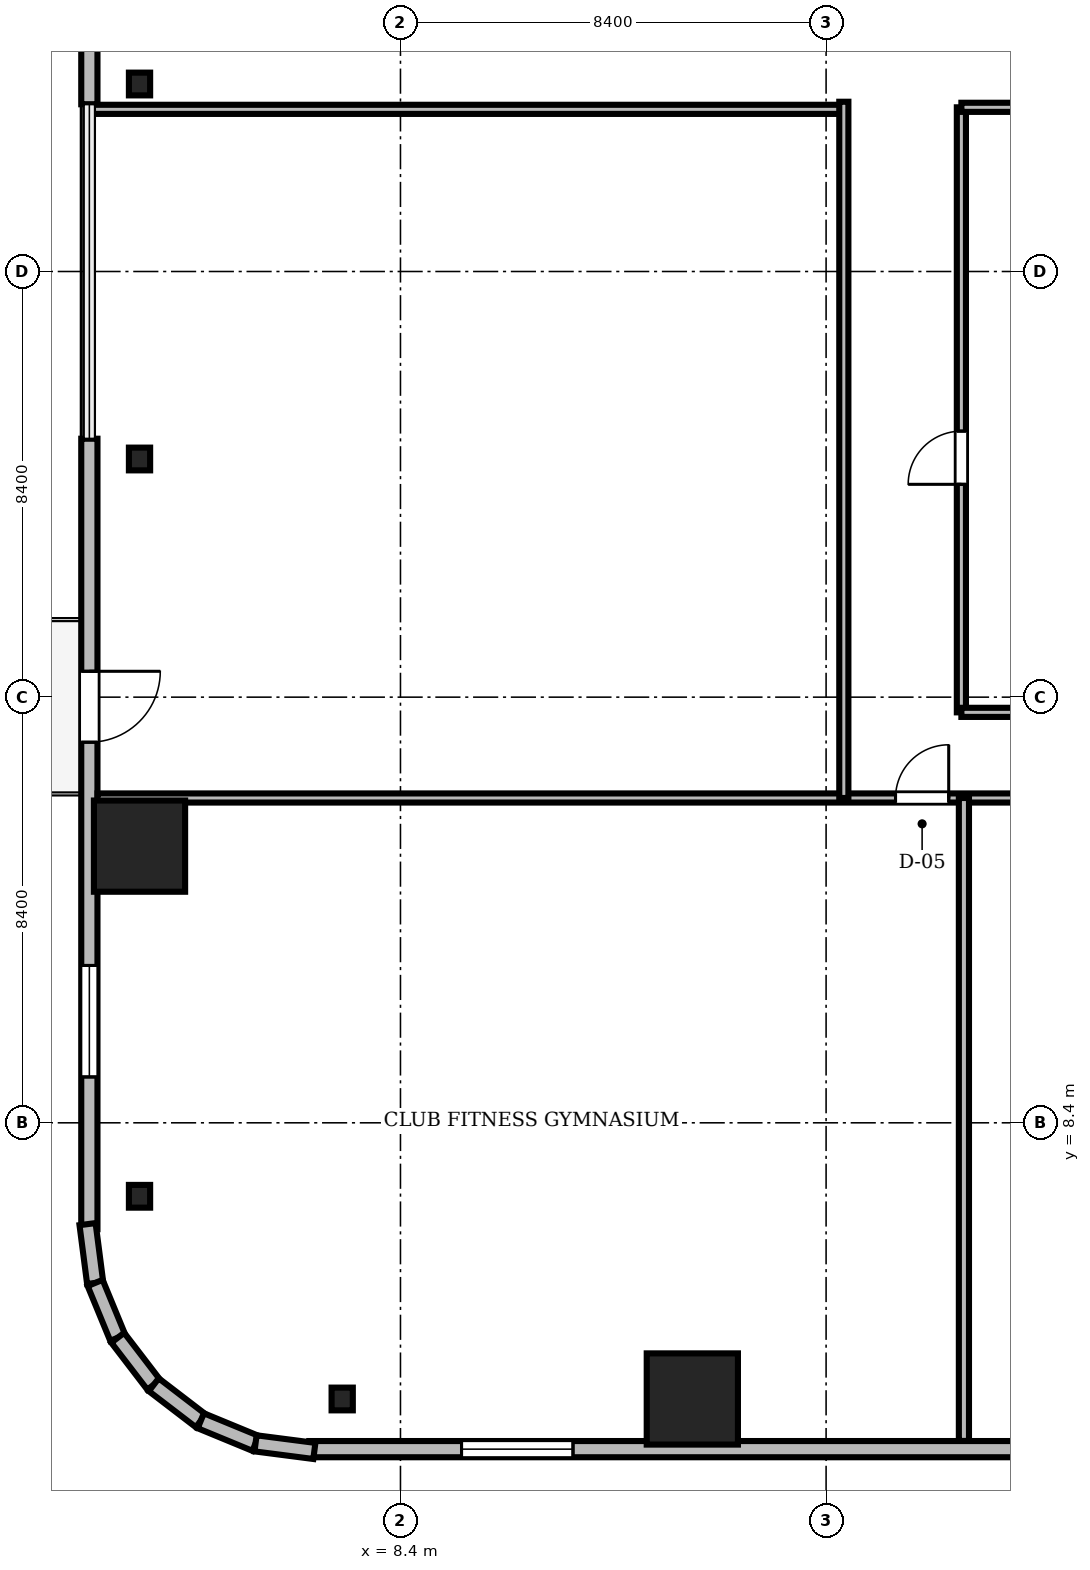
"""IFC4 building model, lengths in metres.
Left out: names, types, materials, properties, quantities, classifications, styles, units other than length and angle.
Written with IfcOpenShell. Run it as: python <this file> out.ifc"""

import sys

from ifc_helpers import new_model, si_unit, direction, frame, frame_2d, origin, origin_2d, place, context, subcontext, project, spatial, rectangle, i_section, extrude, source, transform, mapped, element, fill, save


model = new_model("IFC4")
c1 = context("Model", 3, precision=1e-05, world=origin(), true_north=direction((0.0, 1.0)))
c2 = subcontext(c1, "Body", "Model", "MODEL_VIEW")
j1 = project(units=[si_unit("LENGTHUNIT", "METRE"), si_unit("PLANEANGLEUNIT", "RADIAN")], contexts=[c1])
p1 = place(None, origin())
s1 = spatial("IfcSite", under=j1, at=p1, CompositionType="ELEMENT")
p2 = place(p1, origin())
s2 = spatial("IfcBuilding", under=s1, at=p2, CompositionType="ELEMENT")
p3 = place(p2, frame((0.0, 0.0, 82.35)))
s3 = spatial("IfcBuildingStorey", under=s2, at=p3, CompositionType="ELEMENT", Elevation=82.35)
m1 = source(origin(), c2, "Body", "SweptSolid", [
    extrude(rectangle(XDim=1.8, YDim=1.8, at=origin_2d()), origin(), (0.0, 0.0, 1.0), 3.41),
])
for number, where, z_axis, x_axis in (
    (1, (14.16, 2.95, 0.0), (0.0, 0.0, 1.0), (1.0, 0.0, 0.0)),
    (2, (3.25, 13.86, 0.0), (0.0, 0.0, 1.0), (1.0, 0.0, 0.0)),
):
    element("IfcColumn", number, at=place(p3, frame(where, z_axis=z_axis, x_axis=x_axis)), inside=s3, PredefinedType="COLUMN", context=c2, shape_type="MappedRepresentation", body=[
        mapped(m1, transform((0.0, 0.0, 0.0), scale=1.0)),
    ])
m2 = source(origin(), c2, "Body", "SweptSolid", [
    extrude(i_section(OverallWidth=0.419, OverallDepth=0.449, WebThickness=0.031, FlangeThickness=0.048, FilletRadius=0.015, at=origin_2d()), origin(), (0.0, 0.0, 1.0), 3.41),
])
for number, where, z_axis, x_axis in (
    (3, (7.25, 2.95, 0.0), (0.0, 0.0, 1.0), (1.0, 0.0, 0.0)),
    (4, (3.25, 28.9, 0.0), (0.0, 0.0, 1.0), (1.0, 0.0, 0.0)),
    (5, (3.25, 21.5, 0.0), (0.0, 0.0, 1.0), (1.0, 0.0, 0.0)),
    (6, (3.25, 6.95, 0.0), (0.0, 0.0, 1.0), (1.0, 0.0, 0.0)),
):
    element("IfcColumn", number, at=place(p3, frame(where, z_axis=z_axis, x_axis=x_axis)), inside=s3, PredefinedType="COLUMN", context=c2, shape_type="MappedRepresentation", body=[
        mapped(m2, transform((0.0, 0.0, 0.0), scale=1.0)),
    ])
m3 = source(origin(), c2, "Body", "SweptSolid", [
    extrude(rectangle(XDim=15.6, YDim=0.32, at=frame_2d((7.8, 0.0))), origin(), (0.0, 0.0, 1.0), 3.41),
])
p4 = place(p3, frame((6.6, 1.96, 0.0), z_axis=(0.0, 0.0, 1.0), x_axis=(1.0, 0.0, 0.0)))
e7 = element("IfcWall", 7, at=p4, inside=s3, PredefinedType="SOLIDWALL", context=c2, shape_type="MappedRepresentation", body=[
    mapped(m3, transform((0.0, 0.0, 0.0), scale=1.0)),
])
m4 = source(origin(), c2, "Body", "SweptSolid", [
    extrude(rectangle(XDim=2.2, YDim=2.4, at=frame_2d((1.1, 1.2))), frame((0.0, 0.17, 0.0), z_axis=(0.0, -1.0, 0.0), x_axis=(1.0, 0.0, 0.0)), (0.0, 0.0, 1.0), 0.34),
])
p5 = place(p4, frame((3.005, 0.0, 0.72)))
e8 = element("IfcOpeningElement", 8, at=p5, cuts=e7, PredefinedType="OPENING", context=c2, shape_type="MappedRepresentation", body=[
    mapped(m4, transform((0.0, 0.0, 0.0), scale=1.0)),
])
m5 = source(origin(), c2, "Body", "SweptSolid", [
    extrude(rectangle(XDim=15.6, YDim=0.32, at=frame_2d((7.8, 0.0))), origin(), (0.0, 0.0, 1.0), 3.41),
])
p6 = place(p3, frame((2.26, 44.1, 0.0), z_axis=(0.0, 0.0, 1.0), x_axis=(0.0, -1.0, 0.0)))
e9 = element("IfcWall", 9, at=p6, inside=s3, PredefinedType="SOLIDWALL", context=c2, shape_type="MappedRepresentation", body=[
    mapped(m5, transform((0.0, 0.0, 0.0), scale=1.0)),
])
p7 = place(p6, frame((3.005, 0.0, 0.72)))
e10 = element("IfcOpeningElement", 10, at=p7, cuts=e9, PredefinedType="OPENING", context=c2, shape_type="MappedRepresentation", body=[
    mapped(m4, transform((0.0, 0.0, 0.0), scale=1.0)),
])
p8 = place(p3, frame((2.26, 21.9, 0.0), z_axis=(0.0, 0.0, 1.0), x_axis=(0.0, -1.0, 0.0)))
e11 = element("IfcWall", 11, at=p8, inside=s3, PredefinedType="SOLIDWALL", context=c2, shape_type="MappedRepresentation", body=[
    mapped(m3, transform((0.0, 0.0, 0.0), scale=1.0)),
])
m6 = source(origin(), c2, "Body", "SweptSolid", [
    extrude(rectangle(XDim=1.4, YDim=2.3, at=frame_2d((0.7, 1.15))), frame((0.0, 0.17, 0.0), z_axis=(0.0, -1.0, 0.0), x_axis=(1.0, 0.0, 0.0)), (0.0, 0.0, 1.0), 0.34),
])
p9 = place(p8, frame((4.59, 0.0, 0.0)))
e12 = element("IfcOpeningElement", 12, at=p9, cuts=e11, PredefinedType="OPENING", context=c2, shape_type="MappedRepresentation", body=[
    mapped(m6, transform((0.0, 0.0, 0.0), scale=1.0)),
])
p10 = place(p8, frame((10.395, 0.0, 0.72)))
e13 = element("IfcOpeningElement", 13, at=p10, cuts=e11, PredefinedType="OPENING", context=c2, shape_type="MappedRepresentation", body=[
    mapped(m4, transform((0.0, 0.0, 0.0), scale=1.0)),
])
m7 = source(origin(), c2, "Body", "SweptSolid", [
    extrude(rectangle(XDim=1.171, YDim=0.32, at=frame_2d((0.585, 0.0))), origin(), (0.0, 0.0, 1.0), 3.41),
])
p11 = place(p3, frame((2.224, 6.401, 0.0), z_axis=(0.0, 0.0, 1.0), x_axis=(0.128269133229, -0.991739395941, 0.0)))
e14 = element("IfcWall", 14, at=p11, inside=s3, PredefinedType="SOLIDWALL", context=c2, shape_type="MappedRepresentation", body=[
    mapped(m7, transform((0.0, 0.0, 0.0), scale=1.0)),
])
m8 = source(origin(), c2, "Body", "SweptSolid", [
    extrude(rectangle(XDim=1.169, YDim=0.32, at=frame_2d((0.584, 0.0))), origin(), (0.0, 0.0, 1.0), 3.41),
])
for number, where, z_axis, x_axis in (
    (15, (2.375, 5.24, 0.0), (0.0, 0.0, 1.0), (0.381, -0.925, 0.0)),
    (16, (2.82, 4.159, 0.0), (0.0, 0.0, 1.0), (0.608, -0.794, 0.0)),
):
    element("IfcWall", number, at=place(p3, frame(where, z_axis=z_axis, x_axis=x_axis)), inside=s3, PredefinedType="SOLIDWALL", context=c2, shape_type="MappedRepresentation", body=[
        mapped(m8, transform((0.0, 0.0, 0.0), scale=1.0)),
    ])
m9 = source(origin(), c2, "Body", "SweptSolid", [
    extrude(rectangle(XDim=1.169, YDim=0.32, at=frame_2d((0.584, 0.0))), origin(), (0.0, 0.0, 1.0), 3.41),
])
p12 = place(p3, frame((3.531, 3.231, 0.0), z_axis=(0.0, 0.0, 1.0), x_axis=(0.793663520347, -0.608356981114, 0.0)))
e17 = element("IfcWall", 17, at=p12, inside=s3, PredefinedType="SOLIDWALL", context=c2, shape_type="MappedRepresentation", body=[
    mapped(m9, transform((0.0, 0.0, 0.0), scale=1.0)),
])
m10 = source(origin(), c2, "Body", "SweptSolid", [
    extrude(rectangle(XDim=1.169, YDim=0.32, at=frame_2d((0.585, 0.0))), origin(), (0.0, 0.0, 1.0), 3.41),
])
p13 = place(p3, frame((4.459, 2.52, 0.0), z_axis=(0.0, 0.0, 1.0), x_axis=(0.924479075121, -0.381232789334, 0.0)))
e18 = element("IfcWall", 18, at=p13, inside=s3, PredefinedType="SOLIDWALL", context=c2, shape_type="MappedRepresentation", body=[
    mapped(m10, transform((0.0, 0.0, 0.0), scale=1.0)),
])
m11 = source(origin(), c2, "Body", "SweptSolid", [
    extrude(rectangle(XDim=1.17, YDim=0.32, at=frame_2d((0.585, 0.0))), origin(), (0.0, 0.0, 1.0), 3.41),
])
p14 = place(p3, frame((5.54, 2.074, 0.0), z_axis=(0.0, 0.0, 1.0), x_axis=(0.991762485493, -0.128090485085, 0.0)))
e19 = element("IfcWall", 19, at=p14, inside=s3, PredefinedType="SOLIDWALL", context=c2, shape_type="MappedRepresentation", body=[
    mapped(m11, transform((0.0, 0.0, 0.0), scale=1.0)),
])
m12 = source(origin(), c2, "Body", "SweptSolid", [
    extrude(rectangle(XDim=46.156, YDim=0.18, at=frame_2d((23.078, 0.0))), origin(), (0.0, 0.0, 1.0), 2.652),
])
p15 = place(p3, frame((2.422, 14.81, 0.0), z_axis=(0.0, 0.0, 1.0), x_axis=(1.0, 0.0, 0.0)))
e20 = element("IfcWall", 20, at=p15, inside=s3, PredefinedType="PARTITIONING", context=c2, shape_type="MappedRepresentation", body=[
    mapped(m12, transform((0.0, 0.0, 0.0), scale=1.0)),
])
m13 = source(origin(), c2, "Body", "SweptSolid", [
    extrude(rectangle(XDim=1.05, YDim=2.2, at=frame_2d((0.525, 1.1))), frame((0.0, 0.1, 0.0), z_axis=(0.0, -1.0, 0.0), x_axis=(1.0, 0.0, 0.0)), (0.0, 0.0, 1.0), 0.2),
])
p16 = place(p15, frame((15.748, 0.0, 0.0)))
e21 = element("IfcOpeningElement", 21, at=p16, cuts=e20, PredefinedType="OPENING", context=c2, shape_type="MappedRepresentation", body=[
    mapped(m13, transform((0.0, 0.0, 0.0), scale=1.0)),
])
p17 = place(p15, frame((18.823, 0.0, 0.0)))
e22 = element("IfcOpeningElement", 22, at=p17, cuts=e20, PredefinedType="OPENING", context=c2, shape_type="MappedRepresentation", body=[
    mapped(m13, transform((0.0, 0.0, 0.0), scale=1.0)),
])
p18 = place(p15, frame((23.311, 0.0, 0.0)))
e23 = element("IfcOpeningElement", 23, at=p18, cuts=e20, PredefinedType="OPENING", context=c2, shape_type="MappedRepresentation", body=[
    mapped(m13, transform((0.0, 0.0, 0.0), scale=1.0)),
])
p19 = place(p15, frame((28.839, 0.0, 0.0)))
e24 = element("IfcOpeningElement", 24, at=p19, cuts=e20, PredefinedType="OPENING", context=c2, shape_type="MappedRepresentation", body=[
    mapped(m13, transform((0.0, 0.0, 0.0), scale=1.0)),
])
p20 = place(p15, frame((33.847, 0.0, 0.0)))
e25 = element("IfcOpeningElement", 25, at=p20, cuts=e20, PredefinedType="OPENING", context=c2, shape_type="MappedRepresentation", body=[
    mapped(m13, transform((0.0, 0.0, 0.0), scale=1.0)),
])
p21 = place(p15, frame((37.297, 0.0, 0.0)))
e26 = element("IfcOpeningElement", 26, at=p21, cuts=e20, PredefinedType="OPENING", context=c2, shape_type="MappedRepresentation", body=[
    mapped(m13, transform((0.0, 0.0, 0.0), scale=1.0)),
])
p22 = place(p15, frame((42.315, 0.0, 0.0)))
e27 = element("IfcOpeningElement", 27, at=p22, cuts=e20, PredefinedType="OPENING", context=c2, shape_type="MappedRepresentation", body=[
    mapped(m13, transform((0.0, 0.0, 0.0), scale=1.0)),
])
m14 = source(origin(), c2, "Body", "SweptSolid", [
    extrude(rectangle(XDim=11.94, YDim=0.18, at=frame_2d((5.97, 0.0))), origin(), (0.0, 0.0, 1.0), 2.802),
])
p23 = place(p3, frame((19.47, 16.5, 0.0), z_axis=(0.0, 0.0, 1.0), x_axis=(0.0, 1.0, 0.0)))
e28 = element("IfcWall", 28, at=p23, inside=s3, PredefinedType="PARTITIONING", context=c2, shape_type="MappedRepresentation", body=[
    mapped(m14, transform((0.0, 0.0, 0.0), scale=1.0)),
])
p24 = place(p23, frame((4.5, 0.0, 0.0)))
e29 = element("IfcOpeningElement", 29, at=p24, cuts=e28, PredefinedType="OPENING", context=c2, shape_type="MappedRepresentation", body=[
    mapped(m13, transform((0.0, 0.0, 0.0), scale=1.0)),
])
m15 = source(origin(), c2, "Body", "SweptSolid", [
    extrude(rectangle(XDim=14.92, YDim=0.18, at=frame_2d((7.46, 0.0))), origin(), (0.0, 0.0, 1.0), 2.652),
])
p25 = place(p3, frame((2.23, 28.4, 0.0), z_axis=(0.0, 0.0, 1.0), x_axis=(1.0, 0.0, 0.0)))
e30 = element("IfcWall", 30, at=p25, inside=s3, PredefinedType="PARTITIONING", context=c2, shape_type="MappedRepresentation", body=[
    mapped(m15, transform((0.0, 0.0, 0.0), scale=1.0)),
])
m16 = source(origin(), c2, "Body", "SweptSolid", [
    extrude(rectangle(XDim=13.74, YDim=0.18, at=frame_2d((6.87, 0.0))), origin(), (0.0, 0.0, 1.0), 2.802),
])
p26 = place(p3, frame((17.15, 14.81, 0.0), z_axis=(0.0, 0.0, 1.0), x_axis=(0.0, 1.0, 0.0)))
e31 = element("IfcWall", 31, at=p26, inside=s3, PredefinedType="PARTITIONING", context=c2, shape_type="MappedRepresentation", body=[
    mapped(m16, transform((0.0, 0.0, 0.0), scale=1.0)),
])
m17 = source(origin(), c2, "Body", "SweptSolid", [
    extrude(rectangle(XDim=12.688, YDim=0.2, at=frame_2d((6.344, 0.0))), origin(), (0.0, 0.0, 1.0), 2.652),
])
p27 = place(p3, frame((19.52, 2.122, 0.0), z_axis=(0.0, 0.0, 1.0), x_axis=(0.0, 1.0, 0.0)))
e32 = element("IfcWall", 32, at=p27, inside=s3, PredefinedType="PARTITIONING", context=c2, shape_type="MappedRepresentation", body=[
    mapped(m17, transform((0.0, 0.0, 0.0), scale=1.0)),
])
m18 = source(origin(), c2, "Body", "SweptSolid", [
    extrude(rectangle(XDim=8.93, YDim=0.18, at=frame_2d((4.465, 0.0))), origin(), (0.0, 0.0, 1.0), 2.802),
])
p28 = place(p3, frame((19.47, 16.5, 0.0), z_axis=(0.0, 0.0, 1.0), x_axis=(1.0, 0.0, 0.0)))
e33 = element("IfcWall", 33, at=p28, inside=s3, PredefinedType="PARTITIONING", context=c2, shape_type="MappedRepresentation", body=[
    mapped(m18, transform((0.0, 0.0, 0.0), scale=1.0)),
])
m19 = source(origin(), c2, "Body", "SweptSolid", [
    extrude(rectangle(XDim=8.93, YDim=0.18, at=frame_2d((4.465, 0.0))), origin(), (0.0, 0.0, 1.0), 3.41),
])
p29 = place(p3, frame((19.47, 28.44, 0.0), z_axis=(0.0, 0.0, 1.0), x_axis=(1.0, 0.0, 0.0)))
e34 = element("IfcWall", 34, at=p29, inside=s3, PredefinedType="PARTITIONING", context=c2, shape_type="MappedRepresentation", body=[
    mapped(m19, transform((0.0, 0.0, 0.0), scale=1.0)),
])
m20 = source(origin(), c2, "Body", "SweptSolid", [
    extrude(rectangle(XDim=2.2, YDim=2.4, at=frame_2d((1.1, 1.2))), frame((0.0, 0.03, 0.0), z_axis=(0.0, -1.0, 0.0), x_axis=(1.0, 0.0, 0.0)), (0.0, 0.0, 1.0), 0.06),
])
p30 = place(p5, origin())
e35 = element("IfcWindow", 35, at=p30, inside=s3, PartitioningType="SINGLE_PANEL", PredefinedType="WINDOW", context=c2, shape_type="MappedRepresentation", body=[
    mapped(m20, transform((0.0, 0.0, 0.0), scale=1.0)),
])
fill(e8, e35)
m21 = source(origin(), c2, "Body", "SweptSolid", [
    extrude(rectangle(XDim=1.4, YDim=2.3, at=frame_2d((0.7, 1.15))), frame((0.0, 0.025, 0.0), z_axis=(0.0, -1.0, 0.0), x_axis=(1.0, 0.0, 0.0)), (0.0, 0.0, 1.0), 0.05),
])
p31 = place(p9, frame((1.4, 0.0, 0.0), z_axis=(0.0, 0.0, 1.0), x_axis=(-1.0, 0.0, 0.0)))
e36 = element("IfcDoor", 36, at=p31, inside=s3, OperationType="DOUBLE_DOOR_SLIDING", PredefinedType="DOOR", context=c2, shape_type="MappedRepresentation", body=[
    mapped(m21, transform((0.0, 0.0, 0.0), scale=1.0)),
])
fill(e12, e36)
p32 = place(p10, origin())
e37 = element("IfcWindow", 37, at=p32, inside=s3, PartitioningType="SINGLE_PANEL", PredefinedType="WINDOW", context=c2, shape_type="MappedRepresentation", body=[
    mapped(m20, transform((0.0, 0.0, 0.0), scale=1.0)),
])
fill(e13, e37)
m22 = source(origin(), c2, "Body", "SweptSolid", [
    extrude(rectangle(XDim=1.05, YDim=2.2, at=frame_2d((0.525, 1.1))), frame((0.0, 0.025, 0.0), z_axis=(0.0, -1.0, 0.0), x_axis=(1.0, 0.0, 0.0)), (0.0, 0.0, 1.0), 0.05),
])
p33 = place(p16, origin())
e38 = element("IfcDoor", 38, at=p33, inside=s3, OperationType="SINGLE_SWING_RIGHT", PredefinedType="DOOR", context=c2, shape_type="MappedRepresentation", body=[
    mapped(m22, transform((0.0, 0.0, 0.0), scale=1.0)),
])
fill(e21, e38)
p34 = place(p24, origin())
e39 = element("IfcDoor", 39, at=p34, inside=s3, OperationType="SINGLE_SWING_LEFT", PredefinedType="DOOR", context=c2, shape_type="MappedRepresentation", body=[
    mapped(m22, transform((0.0, 0.0, 0.0), scale=1.0)),
])
fill(e29, e39)
save(model, sys.argv[1])
